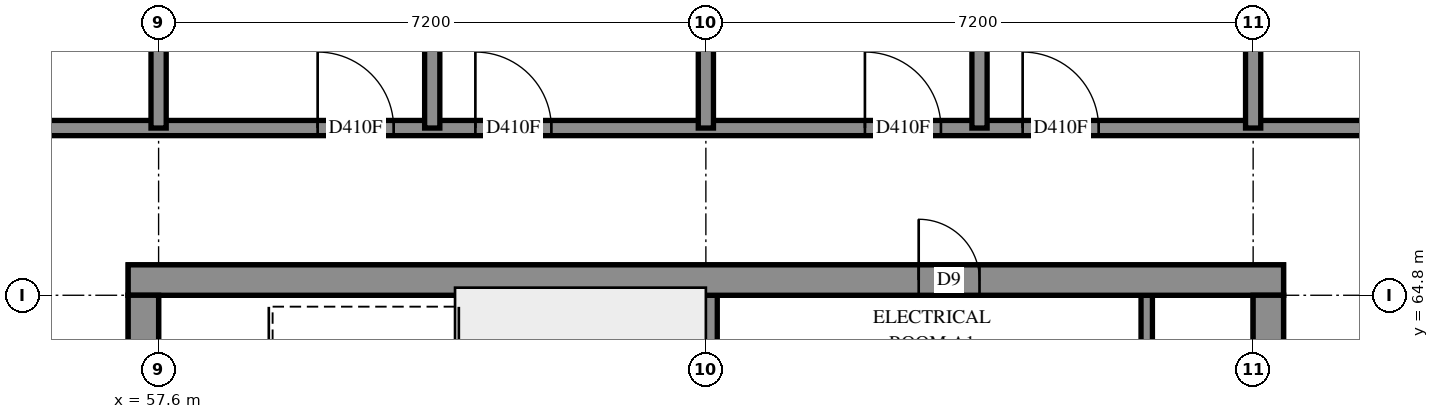
"""IFC4 building model, lengths in metres.
Left out: names, types, materials, properties, quantities, classifications, styles, units other than length and angle.
Written with IfcOpenShell. Run it as: python <this file> out.ifc"""

import sys

from ifc_helpers import new_model, si_unit, direction, frame, frame_2d, origin, place, context, subcontext, project, spatial, polyline, rectangle, outline, extrude, element, fill, save


model = new_model("IFC4")
c1 = context("Model", 3, precision=1e-05, world=origin(), true_north=direction((0.0, 1.0)))
c2 = subcontext(c1, "Body", "Model", "MODEL_VIEW")
j1 = project(units=[si_unit("LENGTHUNIT", "METRE"), si_unit("PLANEANGLEUNIT", "RADIAN")], contexts=[c1])
p1 = place(None, origin())
s1 = spatial("IfcSite", under=j1, at=p1, CompositionType="ELEMENT")
p2 = place(p1, origin())
s2 = spatial("IfcBuilding", under=s1, at=p2, CompositionType="ELEMENT")
p3 = place(p2, frame((0.0, 0.0, 290.6)))
s3 = spatial("IfcBuildingStorey", under=s2, at=p3, CompositionType="ELEMENT", Elevation=290.6)
p4 = place(p3, frame((57.2, 65.0, -0.3), z_axis=(0.0, 0.0, 1.0), x_axis=(1.0, 0.0, 0.0)))
e1 = element("IfcWall", 1, at=p4, inside=s3, PredefinedType="SHEAR", context=c2, shape_type="SweptSolid", body=[
    extrude(rectangle(XDim=15.2, YDim=0.4, at=frame_2d((7.6, 0.0))), origin(), (0.0, 0.0, 1.0), 3.1),
])
p5 = place(p4, frame((10.4, 0.0, 0.3)))
e2 = element("IfcOpeningElement", 2, at=p5, cuts=e1, PredefinedType="OPENING", context=c2, shape_type="SweptSolid", body=[
    extrude(rectangle(XDim=0.8, YDim=2.1, at=frame_2d((0.4, 1.05))), frame((0.0, 0.21, 0.0), z_axis=(0.0, -1.0, 0.0), x_axis=(1.0, 0.0, 0.0)), (0.0, 0.0, 1.0), 0.42),
])
p6 = place(p3, frame((57.4, 50.4, -0.3), z_axis=(0.0, 0.0, 1.0), x_axis=(0.0, 1.0, 0.0)))
e3 = element("IfcWall", 3, at=p6, inside=s3, PredefinedType="SHEAR", context=c2, shape_type="SweptSolid", body=[
    extrude(rectangle(XDim=14.4, YDim=0.4, at=frame_2d((7.2, 0.0))), origin(), (0.0, 0.0, 1.0), 3.1),
])
p7 = place(p6, frame((4.55, 0.0, 0.3)))
e4 = element("IfcOpeningElement", 4, at=p7, cuts=e3, PredefinedType="OPENING", context=c2, shape_type="SweptSolid", body=[
    extrude(rectangle(XDim=1.1, YDim=2.1, at=frame_2d((0.55, 1.05))), frame((0.0, 0.21, 0.0), z_axis=(0.0, -1.0, 0.0), x_axis=(1.0, 0.0, 0.0)), (0.0, 0.0, 1.0), 0.42),
])
p8 = place(p6, frame((11.35, 0.0, 0.3)))
e5 = element("IfcOpeningElement", 5, at=p8, cuts=e3, PredefinedType="OPENING", context=c2, shape_type="SweptSolid", body=[
    extrude(rectangle(XDim=1.1, YDim=2.1, at=frame_2d((0.55, 1.05))), frame((0.0, 0.21, 0.0), z_axis=(0.0, -1.0, 0.0), x_axis=(1.0, 0.0, 0.0)), (0.0, 0.0, 1.0), 0.42),
])
p9 = place(p3, frame((72.2, 50.4, -0.3), z_axis=(0.0, 0.0, 1.0), x_axis=(0.0, 1.0, 0.0)))
e6 = element("IfcWall", 6, at=p9, inside=s3, PredefinedType="SHEAR", context=c2, shape_type="SweptSolid", body=[
    extrude(rectangle(XDim=14.4, YDim=0.4, at=frame_2d((7.2, 0.0))), origin(), (0.0, 0.0, 1.0), 3.1),
])
p10 = place(p9, frame((4.55, 0.0, 0.3)))
e7 = element("IfcOpeningElement", 7, at=p10, cuts=e6, PredefinedType="OPENING", context=c2, shape_type="SweptSolid", body=[
    extrude(rectangle(XDim=1.1, YDim=2.1, at=frame_2d((0.55, 1.05))), frame((0.0, 0.21, 0.0), z_axis=(0.0, -1.0, 0.0), x_axis=(1.0, 0.0, 0.0)), (0.0, 0.0, 1.0), 0.42),
])
p11 = place(p9, frame((11.35, 0.0, 0.3)))
e8 = element("IfcOpeningElement", 8, at=p11, cuts=e6, PredefinedType="OPENING", context=c2, shape_type="SweptSolid", body=[
    extrude(rectangle(XDim=1.1, YDim=2.1, at=frame_2d((0.55, 1.05))), frame((0.0, 0.21, 0.0), z_axis=(0.0, -1.0, 0.0), x_axis=(1.0, 0.0, 0.0)), (0.0, 0.0, 1.0), 0.42),
])
p12 = place(p3, frame((64.8, 60.6, 0.0), z_axis=(0.0, 0.0, 1.0), x_axis=(0.0, 1.0, 0.0)))
e9 = element("IfcWall", 9, at=p12, inside=s3, PredefinedType="SOLIDWALL", context=c2, shape_type="SweptSolid", body=[
    extrude(rectangle(XDim=4.2, YDim=0.3, at=frame_2d((2.1, 0.0))), origin(), (0.0, 0.0, 1.0), 3.5),
])
p13 = place(p3, frame((70.6, 63.78, 0.0), z_axis=(0.0, 0.0, 1.0), x_axis=(0.0, 1.0, 0.0)))
e10 = element("IfcWall", 10, at=p13, inside=s3, PredefinedType="PARTITIONING", context=c2, shape_type="SweptSolid", body=[
    extrude(rectangle(XDim=1.02, YDim=0.15, at=frame_2d((0.51, 0.0))), origin(), (0.0, 0.0, 1.0), 3.5),
])
p14 = place(p3, frame((55.4, 67.0, 0.0), z_axis=(0.0, 0.0, 1.0), x_axis=(1.0, 0.0, 0.0)))
e11 = element("IfcWall", 11, at=p14, inside=s3, PredefinedType="PARTITIONING", context=c2, shape_type="SweptSolid", body=[
    extrude(rectangle(XDim=18.8, YDim=0.2, at=frame_2d((9.4, 0.0))), origin(), (0.0, 0.0, 1.0), 3.5),
])
p15 = place(p14, frame((4.293, 0.0, 0.0)))
e12 = element("IfcOpeningElement", 12, at=p15, cuts=e11, PredefinedType="OPENING", context=c2, shape_type="SweptSolid", body=[
    extrude(rectangle(XDim=1.0, YDim=2.1, at=frame_2d((0.5, 1.05))), frame((0.0, 0.11, 0.0), z_axis=(0.0, -1.0, 0.0), x_axis=(1.0, 0.0, 0.0)), (0.0, 0.0, 1.0), 0.22),
])
p16 = place(p14, frame((6.367, 0.0, 0.0)))
e13 = element("IfcOpeningElement", 13, at=p16, cuts=e11, PredefinedType="OPENING", context=c2, shape_type="SweptSolid", body=[
    extrude(rectangle(XDim=1.0, YDim=2.1, at=frame_2d((0.5, 1.05))), frame((0.0, 0.11, 0.0), z_axis=(0.0, -1.0, 0.0), x_axis=(1.0, 0.0, 0.0)), (0.0, 0.0, 1.0), 0.22),
])
p17 = place(p14, frame((11.492, 0.0, 0.0)))
e14 = element("IfcOpeningElement", 14, at=p17, cuts=e11, PredefinedType="OPENING", context=c2, shape_type="SweptSolid", body=[
    extrude(rectangle(XDim=1.0, YDim=2.1, at=frame_2d((0.5, 1.05))), frame((0.0, 0.11, 0.0), z_axis=(0.0, -1.0, 0.0), x_axis=(1.0, 0.0, 0.0)), (0.0, 0.0, 1.0), 0.22),
])
p18 = place(p14, frame((13.568, 0.0, 0.0)))
e15 = element("IfcOpeningElement", 15, at=p18, cuts=e11, PredefinedType="OPENING", context=c2, shape_type="SweptSolid", body=[
    extrude(rectangle(XDim=1.0, YDim=2.1, at=frame_2d((0.5, 1.05))), frame((0.0, 0.11, 0.0), z_axis=(0.0, -1.0, 0.0), x_axis=(1.0, 0.0, 0.0)), (0.0, 0.0, 1.0), 0.22),
])
for number, where, z_axis, x_axis in (
    (16, (57.6, 67.0, 0.0), (0.0, 0.0, 1.0), (0.0, 1.0, 0.0)),
    (17, (64.8, 67.0, 0.0), (0.0, 0.0, 1.0), (0.0, 1.0, 0.0)),
    (18, (72.0, 67.0, 0.0), (0.0, 0.0, 1.0), (0.0, 1.0, 0.0)),
):
    element("IfcWall", number, at=place(p3, frame(where, z_axis=z_axis, x_axis=x_axis)), inside=s3, PredefinedType="PARTITIONING", context=c2, shape_type="SweptSolid", body=[
        extrude(rectangle(XDim=5.35, YDim=0.2, at=frame_2d((2.675, 0.0))), origin(), (0.0, 0.0, 1.0), 3.5),
    ])
for number, where, z_axis, x_axis in (
    (19, (61.2, 67.0, 0.0), (0.0, 0.0, 1.0), (0.0, 1.0, 0.0)),
    (20, (68.4, 67.0, 0.0), (0.0, 0.0, 1.0), (0.0, 1.0, 0.0)),
):
    element("IfcWall", number, at=place(p3, frame(where, z_axis=z_axis, x_axis=x_axis)), inside=s3, PredefinedType="PARTITIONING", context=c2, shape_type="SweptSolid", body=[
        extrude(outline(polyline([(0.0, -0.1), (5.8, -0.1), (5.8, 0.1), (0.0, 0.1), (0.0, -0.1)])), origin(), (0.0, 0.0, 1.0), 3.5),
    ])
p19 = place(p5, origin())
e21 = element("IfcDoor", 21, at=p19, inside=s3, OperationType="SINGLE_SWING_RIGHT", PredefinedType="DOOR", context=c2, shape_type="SweptSolid", body=[
    extrude(rectangle(XDim=0.8, YDim=2.1, at=frame_2d((0.4, 1.05))), frame((0.0, 0.025, 0.0), z_axis=(0.0, -1.0, 0.0), x_axis=(1.0, 0.0, 0.0)), (0.0, 0.0, 1.0), 0.05),
])
fill(e2, e21)
p20 = place(p15, origin())
e22 = element("IfcDoor", 22, at=p20, inside=s3, OperationType="SINGLE_SWING_RIGHT", PredefinedType="DOOR", context=c2, shape_type="SweptSolid", body=[
    extrude(rectangle(XDim=1.0, YDim=2.1, at=frame_2d((0.5, 1.05))), frame((0.0, 0.025, 0.0), z_axis=(0.0, -1.0, 0.0), x_axis=(1.0, 0.0, 0.0)), (0.0, 0.0, 1.0), 0.05),
])
fill(e12, e22)
p21 = place(p16, origin())
e23 = element("IfcDoor", 23, at=p21, inside=s3, OperationType="SINGLE_SWING_LEFT", PredefinedType="DOOR", context=c2, shape_type="SweptSolid", body=[
    extrude(rectangle(XDim=1.0, YDim=2.1, at=frame_2d((0.5, 1.05))), frame((0.0, 0.025, 0.0), z_axis=(0.0, -1.0, 0.0), x_axis=(1.0, 0.0, 0.0)), (0.0, 0.0, 1.0), 0.05),
])
fill(e13, e23)
p22 = place(p17, origin())
e24 = element("IfcDoor", 24, at=p22, inside=s3, OperationType="SINGLE_SWING_RIGHT", PredefinedType="DOOR", context=c2, shape_type="SweptSolid", body=[
    extrude(rectangle(XDim=1.0, YDim=2.1, at=frame_2d((0.5, 1.05))), frame((0.0, 0.025, 0.0), z_axis=(0.0, -1.0, 0.0), x_axis=(1.0, 0.0, 0.0)), (0.0, 0.0, 1.0), 0.05),
])
fill(e14, e24)
p23 = place(p18, origin())
e25 = element("IfcDoor", 25, at=p23, inside=s3, OperationType="SINGLE_SWING_LEFT", PredefinedType="DOOR", context=c2, shape_type="SweptSolid", body=[
    extrude(rectangle(XDim=1.0, YDim=2.1, at=frame_2d((0.5, 1.05))), frame((0.0, 0.025, 0.0), z_axis=(0.0, -1.0, 0.0), x_axis=(1.0, 0.0, 0.0)), (0.0, 0.0, 1.0), 0.05),
])
fill(e15, e25)
save(model, sys.argv[1])
